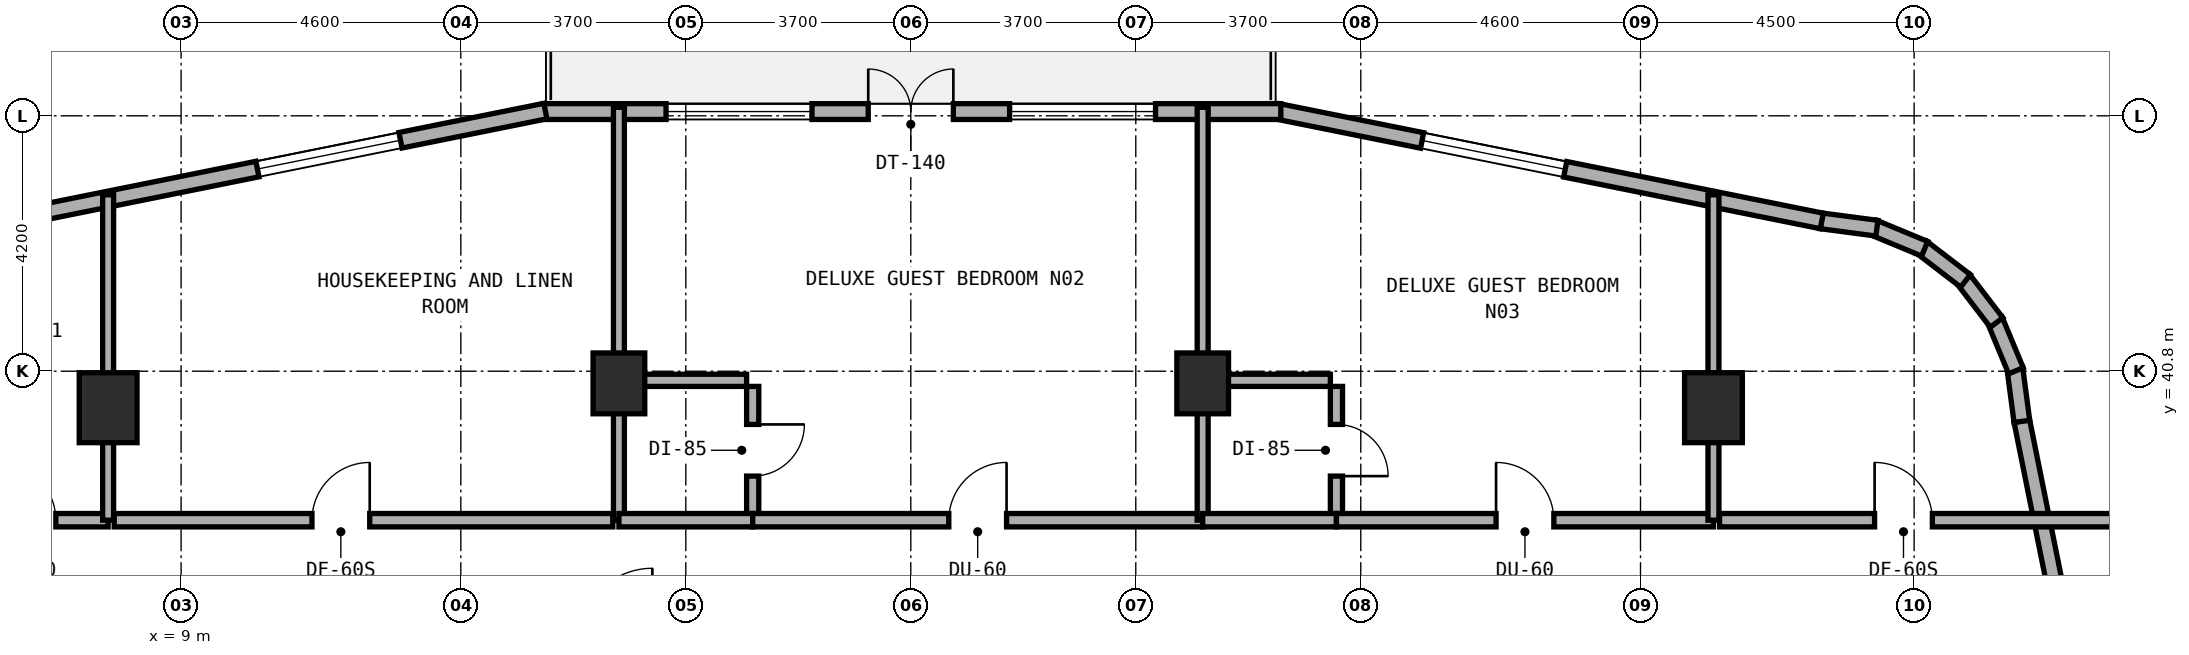
"""IFC4 building model, lengths in metres.
Left out: names, types, materials, properties, quantities, classifications, styles, units other than length and angle.
Written with IfcOpenShell. Run it as: python <this file> out.ifc"""

import sys

from ifc_helpers import new_model, si_unit, direction, frame, frame_2d, origin, origin_2d, place, context, subcontext, project, spatial, rectangle, extrude, element, fill, save


model = new_model("IFC4")
c1 = context("Model", 3, precision=1e-05, world=origin(), true_north=direction((0.0, 1.0)))
c2 = subcontext(c1, "Body", "Model", "MODEL_VIEW")
j1 = project(units=[si_unit("LENGTHUNIT", "METRE"), si_unit("PLANEANGLEUNIT", "RADIAN")], contexts=[c1])
p1 = place(None, origin())
s1 = spatial("IfcSite", under=j1, at=p1, CompositionType="ELEMENT")
p2 = place(p1, origin())
s2 = spatial("IfcBuilding", under=s1, at=p2, CompositionType="ELEMENT")
p3 = place(p2, frame((0.0, 0.0, 95.0)))
s3 = spatial("IfcBuildingStorey", under=s2, at=p3, CompositionType="ELEMENT", Elevation=95.0)
for number, where, z_axis, x_axis in (
    (1, (16.2, 40.6, 0.0), (0.0, 0.0, 1.0), (1.0, 0.0, 0.0)),
    (2, (25.8, 40.6, 0.0), (0.0, 0.0, 1.0), (1.0, 0.0, 0.0)),
):
    element("IfcColumn", number, at=place(p3, frame(where, z_axis=z_axis, x_axis=x_axis)), inside=s3, PredefinedType="COLUMN", context=c2, shape_type="SweptSolid", body=[
        extrude(rectangle(XDim=0.85, YDim=1.0, at=origin_2d()), origin(), (0.0, 0.0, 1.0), 3.5),
    ])
for number, where, z_axis, x_axis in (
    (3, (34.2, 40.2, 0.0), (0.0, 0.0, 1.0), (1.0, 0.0, 0.0)),
    (4, (7.8, 40.2, 0.0), (0.0, 0.0, 1.0), (1.0, 0.0, 0.0)),
):
    element("IfcColumn", number, at=place(p3, frame(where, z_axis=z_axis, x_axis=x_axis)), inside=s3, PredefinedType="COLUMN", context=c2, shape_type="SweptSolid", body=[
        extrude(rectangle(XDim=0.95, YDim=1.15, at=origin_2d()), origin(), (0.0, 0.0, 1.0), 3.5),
    ])
p4 = place(p3, frame((41.084, 30.98, 0.0), z_axis=(0.0, 0.0, 1.0), x_axis=(-0.197435082048, 0.980315963543, 0.0)))
e5 = element("IfcWall", 5, at=p4, inside=s3, PredefinedType="STANDARD", context=c2, shape_type="SweptSolid", body=[
    extrude(rectangle(XDim=9.183, YDim=0.26, at=frame_2d((4.591, 0.0))), origin(), (0.0, 0.0, 1.0), 3.22),
])
p5 = place(p4, frame((2.497, 0.0, 0.8)))
e6 = element("IfcOpeningElement", 6, at=p5, cuts=e5, PredefinedType="OPENING", context=c2, shape_type="SweptSolid", body=[
    extrude(rectangle(XDim=2.4, YDim=1.6, at=frame_2d((1.2, 0.8))), frame((0.0, 0.14, 0.0), z_axis=(0.0, -1.0, 0.0), x_axis=(1.0, 0.0, 0.0)), (0.0, 0.0, 1.0), 0.28),
])
p6 = place(p3, frame((39.272, 39.975, 0.0), z_axis=(0.0, 0.0, 1.0), x_axis=(-0.130953706898, 0.991388484223, 0.0)))
e7 = element("IfcWall", 7, at=p6, inside=s3, PredefinedType="STANDARD", context=c2, shape_type="SweptSolid", body=[
    extrude(rectangle(XDim=0.885, YDim=0.26, at=frame_2d((0.443, 0.0))), origin(), (0.0, 0.0, 1.0), 3.22),
])
p7 = place(p3, frame((39.174, 40.807, 0.0), z_axis=(0.0, 0.0, 1.0), x_axis=(-0.383290660547, 0.923627776508, 0.0)))
e8 = element("IfcWall", 8, at=p7, inside=s3, PredefinedType="STANDARD", context=c2, shape_type="SweptSolid", body=[
    extrude(rectangle(XDim=0.903, YDim=0.26, at=frame_2d((0.452, 0.0))), origin(), (0.0, 0.0, 1.0), 3.22),
])
p8 = place(p3, frame((38.856, 41.601, 0.0), z_axis=(0.0, 0.0, 1.0), x_axis=(-0.608624690463, 0.793458244748, 0.0)))
e9 = element("IfcWall", 9, at=p8, inside=s3, PredefinedType="STANDARD", context=c2, shape_type="SweptSolid", body=[
    extrude(rectangle(XDim=0.902, YDim=0.26, at=frame_2d((0.451, 0.0))), origin(), (0.0, 0.0, 1.0), 3.22),
])
p9 = place(p3, frame((38.345, 42.286, 0.0), z_axis=(0.0, 0.0, 1.0), x_axis=(-0.793558456666, 0.608494022858, 0.0)))
e10 = element("IfcWall", 10, at=p9, inside=s3, PredefinedType="STANDARD", context=c2, shape_type="SweptSolid", body=[
    extrude(rectangle(XDim=0.902, YDim=0.26, at=frame_2d((0.451, 0.0))), origin(), (0.0, 0.0, 1.0), 3.22),
])
p10 = place(p3, frame((37.673, 42.814, 0.0), z_axis=(0.0, 0.0, 1.0), x_axis=(-0.923683767999, 0.383155708213, 0.0)))
e11 = element("IfcWall", 11, at=p10, inside=s3, PredefinedType="STANDARD", context=c2, shape_type="SweptSolid", body=[
    extrude(rectangle(XDim=0.903, YDim=0.26, at=frame_2d((0.451, 0.0))), origin(), (0.0, 0.0, 1.0), 3.22),
])
p11 = place(p3, frame((36.888, 43.152, 0.0), z_axis=(0.0, 0.0, 1.0), x_axis=(-0.991487658083, 0.130200706103, 0.0)))
e12 = element("IfcWall", 12, at=p11, inside=s3, PredefinedType="STANDARD", context=c2, shape_type="SweptSolid", body=[
    extrude(rectangle(XDim=0.921, YDim=0.26, at=frame_2d((0.46, 0.0))), origin(), (0.0, 0.0, 1.0), 3.22),
])
p12 = place(p3, frame((35.982, 43.271, 0.0), z_axis=(0.0, 0.0, 1.0), x_axis=(-0.980317172899, 0.197429077186, 0.0)))
e13 = element("IfcWall", 13, at=p12, inside=s3, PredefinedType="STANDARD", context=c2, shape_type="SweptSolid", body=[
    extrude(rectangle(XDim=9.117, YDim=0.26, at=frame_2d((4.559, 0.0))), origin(), (0.0, 0.0, 1.0), 3.22),
])
p13 = place(p12, frame((4.305, 0.0, 0.8)))
e14 = element("IfcOpeningElement", 14, at=p13, cuts=e13, PredefinedType="OPENING", context=c2, shape_type="SweptSolid", body=[
    extrude(rectangle(XDim=2.4, YDim=1.6, at=frame_2d((1.2, 0.8))), frame((0.0, 0.14, 0.0), z_axis=(0.0, -1.0, 0.0), x_axis=(1.0, 0.0, 0.0)), (0.0, 0.0, 1.0), 0.28),
])
p14 = place(p3, frame((27.085, 45.07, 0.0), z_axis=(0.0, 0.0, 1.0), x_axis=(-1.0, 0.0, 0.0)))
e15 = element("IfcWall", 15, at=p14, inside=s3, PredefinedType="STANDARD", context=c2, shape_type="SweptSolid", body=[
    extrude(rectangle(XDim=12.135, YDim=0.26, at=frame_2d((6.067, 0.0))), origin(), (0.0, 0.0, 1.0), 3.22),
])
p15 = place(p14, frame((5.385, 0.0, 0.0)))
e16 = element("IfcOpeningElement", 16, at=p15, cuts=e15, PredefinedType="OPENING", context=c2, shape_type="SweptSolid", body=[
    extrude(rectangle(XDim=1.4, YDim=2.15, at=frame_2d((0.7, 1.075))), frame((0.0, 0.14, 0.0), z_axis=(0.0, -1.0, 0.0), x_axis=(1.0, 0.0, 0.0)), (0.0, 0.0, 1.0), 0.28),
])
p16 = place(p14, frame((2.06, 0.0, 0.8)))
e17 = element("IfcOpeningElement", 17, at=p16, cuts=e15, PredefinedType="OPENING", context=c2, shape_type="SweptSolid", body=[
    extrude(rectangle(XDim=2.4, YDim=1.6, at=frame_2d((1.2, 0.8))), frame((0.0, 0.14, 0.0), z_axis=(0.0, -1.0, 0.0), x_axis=(1.0, 0.0, 0.0)), (0.0, 0.0, 1.0), 0.28),
])
p17 = place(p14, frame((7.71, 0.0, 0.8)))
e18 = element("IfcOpeningElement", 18, at=p17, cuts=e15, PredefinedType="OPENING", context=c2, shape_type="SweptSolid", body=[
    extrude(rectangle(XDim=2.4, YDim=1.6, at=frame_2d((1.2, 0.8))), frame((0.0, 0.14, 0.0), z_axis=(0.0, -1.0, 0.0), x_axis=(1.0, 0.0, 0.0)), (0.0, 0.0, 1.0), 0.28),
])
p18 = place(p3, frame((14.991, 45.078, 0.0), z_axis=(0.0, 0.0, 1.0), x_axis=(-0.980321298532, -0.197408590603, 0.0)))
e19 = element("IfcWall", 19, at=p18, inside=s3, PredefinedType="STANDARD", context=c2, shape_type="SweptSolid", body=[
    extrude(rectangle(XDim=9.153, YDim=0.26, at=frame_2d((4.577, 0.0))), origin(), (0.0, 0.0, 1.0), 3.22),
])
p19 = place(p18, frame((2.431, 0.0, 0.8)))
e20 = element("IfcOpeningElement", 20, at=p19, cuts=e19, PredefinedType="OPENING", context=c2, shape_type="SweptSolid", body=[
    extrude(rectangle(XDim=2.4, YDim=1.6, at=frame_2d((1.2, 0.8))), frame((0.0, 0.14, 0.0), z_axis=(0.0, -1.0, 0.0), x_axis=(1.0, 0.0, 0.0)), (0.0, 0.0, 1.0), 0.28),
])
p20 = place(p3, frame((5.55, 38.35, 0.0), z_axis=(0.0, 0.0, 1.0), x_axis=(1.0, 0.0, 0.0)))
e21 = element("IfcWall", 21, at=p20, inside=s3, PredefinedType="SOLIDWALL", context=c2, shape_type="SweptSolid", body=[
    extrude(rectangle(XDim=2.25, YDim=0.22, at=frame_2d((1.125, 0.0))), origin(), (0.0, 0.0, 1.0), 2.595),
])
p21 = place(p20, frame((0.44, 0.0, 0.0)))
e22 = element("IfcOpeningElement", 22, at=p21, cuts=e21, PredefinedType="OPENING", context=c2, shape_type="SweptSolid", body=[
    extrude(rectangle(XDim=0.95, YDim=2.1, at=frame_2d((0.475, 1.05))), frame((0.0, 0.12, 0.0), z_axis=(0.0, -1.0, 0.0), x_axis=(1.0, 0.0, 0.0)), (0.0, 0.0, 1.0), 0.24),
])
p22 = place(p3, frame((7.8, 38.35, 0.0), z_axis=(0.0, 0.0, 1.0), x_axis=(0.0, 1.0, 0.0)))
e23 = element("IfcWall", 23, at=p22, inside=s3, PredefinedType="SOLIDWALL", context=c2, shape_type="SweptSolid", body=[
    extrude(rectangle(XDim=5.351, YDim=0.18, at=frame_2d((2.675, 0.0))), origin(), (0.0, 0.0, 1.0), 2.595),
])
p23 = place(p3, frame((7.9, 38.35, 0.0), z_axis=(0.0, 0.0, 1.0), x_axis=(1.0, 0.0, 0.0)))
e24 = element("IfcWall", 24, at=p23, inside=s3, PredefinedType="SOLIDWALL", context=c2, shape_type="SweptSolid", body=[
    extrude(rectangle(XDim=8.2, YDim=0.22, at=frame_2d((4.1, 0.0))), origin(), (0.0, 0.0, 1.0), 3.22),
])
p24 = place(p23, frame((3.252, 0.0, 0.0)))
e25 = element("IfcOpeningElement", 25, at=p24, cuts=e24, PredefinedType="OPENING", context=c2, shape_type="SweptSolid", body=[
    extrude(rectangle(XDim=0.95, YDim=2.1, at=frame_2d((0.475, 1.05))), frame((0.0, 0.12, 0.0), z_axis=(0.0, -1.0, 0.0), x_axis=(1.0, 0.0, 0.0)), (0.0, 0.0, 1.0), 0.24),
])
p25 = place(p3, frame((16.2, 38.35, 0.0), z_axis=(0.0, 0.0, 1.0), x_axis=(0.0, 1.0, 0.0)))
e26 = element("IfcWall", 26, at=p25, inside=s3, PredefinedType="SOLIDWALL", context=c2, shape_type="SweptSolid", body=[
    extrude(rectangle(XDim=6.79, YDim=0.18, at=frame_2d((3.395, 0.0))), origin(), (0.0, 0.0, 1.0), 2.595),
])
p26 = place(p3, frame((18.4, 38.45, 0.0), z_axis=(0.0, 0.0, 1.0), x_axis=(0.0, 1.0, 0.0)))
e27 = element("IfcWall", 27, at=p26, inside=s3, PredefinedType="PLUMBINGWALL", context=c2, shape_type="SweptSolid", body=[
    extrude(rectangle(XDim=2.1, YDim=0.2, at=frame_2d((1.05, 0.0))), origin(), (0.0, 0.0, 1.0), 2.835),
])
p27 = place(p26, frame((0.625, 0.0, 0.0)))
e28 = element("IfcOpeningElement", 28, at=p27, cuts=e27, PredefinedType="OPENING", context=c2, shape_type="SweptSolid", body=[
    extrude(rectangle(XDim=0.85, YDim=2.1, at=frame_2d((0.425, 1.05))), frame((0.0, 0.11, 0.0), z_axis=(0.0, -1.0, 0.0), x_axis=(1.0, 0.0, 0.0)), (0.0, 0.0, 1.0), 0.22),
])
p28 = place(p3, frame((16.3, 40.65, 0.0), z_axis=(0.0, 0.0, 1.0), x_axis=(1.0, 0.0, 0.0)))
e29 = element("IfcWall", 29, at=p28, inside=s3, PredefinedType="PLUMBINGWALL", context=c2, shape_type="SweptSolid", body=[
    extrude(rectangle(XDim=2.0, YDim=0.2, at=frame_2d((1.0, 0.0))), origin(), (0.0, 0.0, 1.0), 2.835),
])
p29 = place(p3, frame((16.2, 38.35, 0.0), z_axis=(0.0, 0.0, 1.0), x_axis=(1.0, 0.0, 0.0)))
e30 = element("IfcWall", 30, at=p29, inside=s3, PredefinedType="SOLIDWALL", context=c2, shape_type="SweptSolid", body=[
    extrude(rectangle(XDim=2.2, YDim=0.22, at=frame_2d((1.1, 0.0))), origin(), (0.0, 0.0, 1.0), 2.595),
])
p30 = place(p3, frame((18.4, 38.35, 0.0), z_axis=(0.0, 0.0, 1.0), x_axis=(1.0, 0.0, 0.0)))
e31 = element("IfcWall", 31, at=p30, inside=s3, PredefinedType="SOLIDWALL", context=c2, shape_type="SweptSolid", body=[
    extrude(rectangle(XDim=7.4, YDim=0.22, at=frame_2d((3.7, 0.0))), origin(), (0.0, 0.0, 1.0), 2.595),
])
p31 = place(p30, frame((3.225, 0.0, 0.0)))
e32 = element("IfcOpeningElement", 32, at=p31, cuts=e31, PredefinedType="OPENING", context=c2, shape_type="SweptSolid", body=[
    extrude(rectangle(XDim=0.95, YDim=2.1, at=frame_2d((0.475, 1.05))), frame((0.0, 0.12, 0.0), z_axis=(0.0, -1.0, 0.0), x_axis=(1.0, 0.0, 0.0)), (0.0, 0.0, 1.0), 0.24),
])
p32 = place(p3, frame((25.8, 38.35, 0.0), z_axis=(0.0, 0.0, 1.0), x_axis=(0.0, 1.0, 0.0)))
e33 = element("IfcWall", 33, at=p32, inside=s3, PredefinedType="SOLIDWALL", context=c2, shape_type="SweptSolid", body=[
    extrude(rectangle(XDim=6.79, YDim=0.18, at=frame_2d((3.395, 0.0))), origin(), (0.0, 0.0, 1.0), 2.595),
])
p33 = place(p3, frame((28.0, 38.45, 0.0), z_axis=(0.0, 0.0, 1.0), x_axis=(0.0, 1.0, 0.0)))
e34 = element("IfcWall", 34, at=p33, inside=s3, PredefinedType="PLUMBINGWALL", context=c2, shape_type="SweptSolid", body=[
    extrude(rectangle(XDim=2.1, YDim=0.2, at=frame_2d((1.05, 0.0))), origin(), (0.0, 0.0, 1.0), 2.835),
])
p34 = place(p33, frame((0.625, 0.0, 0.0)))
e35 = element("IfcOpeningElement", 35, at=p34, cuts=e34, PredefinedType="OPENING", context=c2, shape_type="SweptSolid", body=[
    extrude(rectangle(XDim=0.85, YDim=2.1, at=frame_2d((0.425, 1.05))), frame((0.0, 0.11, 0.0), z_axis=(0.0, -1.0, 0.0), x_axis=(1.0, 0.0, 0.0)), (0.0, 0.0, 1.0), 0.22),
])
p35 = place(p3, frame((25.9, 40.65, 0.0), z_axis=(0.0, 0.0, 1.0), x_axis=(1.0, 0.0, 0.0)))
e36 = element("IfcWall", 36, at=p35, inside=s3, PredefinedType="PLUMBINGWALL", context=c2, shape_type="SweptSolid", body=[
    extrude(rectangle(XDim=2.0, YDim=0.2, at=frame_2d((1.0, 0.0))), origin(), (0.0, 0.0, 1.0), 2.835),
])
p36 = place(p3, frame((25.8, 38.35, 0.0), z_axis=(0.0, 0.0, 1.0), x_axis=(1.0, 0.0, 0.0)))
e37 = element("IfcWall", 37, at=p36, inside=s3, PredefinedType="SOLIDWALL", context=c2, shape_type="SweptSolid", body=[
    extrude(rectangle(XDim=2.2, YDim=0.22, at=frame_2d((1.1, 0.0))), origin(), (0.0, 0.0, 1.0), 2.595),
])
p37 = place(p3, frame((28.0, 38.35, 0.0), z_axis=(0.0, 0.0, 1.0), x_axis=(1.0, 0.0, 0.0)))
e38 = element("IfcWall", 38, at=p37, inside=s3, PredefinedType="SOLIDWALL", context=c2, shape_type="SweptSolid", body=[
    extrude(rectangle(XDim=6.2, YDim=0.22, at=frame_2d((3.1, 0.0))), origin(), (0.0, 0.0, 1.0), 2.595),
])
p38 = place(p37, frame((2.625, 0.0, 0.0)))
e39 = element("IfcOpeningElement", 39, at=p38, cuts=e38, PredefinedType="OPENING", context=c2, shape_type="SweptSolid", body=[
    extrude(rectangle(XDim=0.95, YDim=2.1, at=frame_2d((0.475, 1.05))), frame((0.0, 0.12, 0.0), z_axis=(0.0, -1.0, 0.0), x_axis=(1.0, 0.0, 0.0)), (0.0, 0.0, 1.0), 0.24),
])
p39 = place(p3, frame((34.2, 38.35, 0.0), z_axis=(0.0, 0.0, 1.0), x_axis=(0.0, 1.0, 0.0)))
e40 = element("IfcWall", 40, at=p39, inside=s3, PredefinedType="SOLIDWALL", context=c2, shape_type="SweptSolid", body=[
    extrude(rectangle(XDim=5.351, YDim=0.18, at=frame_2d((2.675, 0.0))), origin(), (0.0, 0.0, 1.0), 2.595),
])
p40 = place(p3, frame((34.3, 38.35, 0.0), z_axis=(0.0, 0.0, 1.0), x_axis=(1.0, 0.0, 0.0)))
e41 = element("IfcWall", 41, at=p40, inside=s3, PredefinedType="SOLIDWALL", context=c2, shape_type="SweptSolid", body=[
    extrude(rectangle(XDim=6.64, YDim=0.22, at=frame_2d((3.32, 0.0))), origin(), (0.0, 0.0, 1.0), 2.835),
])
p41 = place(p40, frame((2.55, 0.0, 0.0)))
e42 = element("IfcOpeningElement", 42, at=p41, cuts=e41, PredefinedType="OPENING", context=c2, shape_type="SweptSolid", body=[
    extrude(rectangle(XDim=0.95, YDim=2.1, at=frame_2d((0.475, 1.05))), frame((0.0, 0.12, 0.0), z_axis=(0.0, -1.0, 0.0), x_axis=(1.0, 0.0, 0.0)), (0.0, 0.0, 1.0), 0.24),
])
p42 = place(p13, origin())
e43 = element("IfcWindow", 43, at=p42, inside=s3, PartitioningType="SINGLE_PANEL", PredefinedType="WINDOW", context=c2, shape_type="SweptSolid", body=[
    extrude(rectangle(XDim=2.4, YDim=1.6, at=frame_2d((1.2, 0.8))), frame((0.0, 0.03, 0.0), z_axis=(0.0, -1.0, 0.0), x_axis=(1.0, 0.0, 0.0)), (0.0, 0.0, 1.0), 0.06),
])
fill(e14, e43)
p43 = place(p15, frame((1.4, 0.0, 0.0), z_axis=(0.0, 0.0, 1.0), x_axis=(-1.0, 0.0, 0.0)))
e44 = element("IfcDoor", 44, at=p43, inside=s3, OperationType="DOUBLE_DOOR_SINGLE_SWING", PredefinedType="DOOR", context=c2, shape_type="SweptSolid", body=[
    extrude(rectangle(XDim=1.4, YDim=2.15, at=frame_2d((0.7, 1.075))), frame((0.0, 0.025, 0.0), z_axis=(0.0, -1.0, 0.0), x_axis=(1.0, 0.0, 0.0)), (0.0, 0.0, 1.0), 0.05),
])
fill(e16, e44)
p44 = place(p16, origin())
e45 = element("IfcWindow", 45, at=p44, inside=s3, PartitioningType="SINGLE_PANEL", PredefinedType="WINDOW", context=c2, shape_type="SweptSolid", body=[
    extrude(rectangle(XDim=2.4, YDim=1.6, at=frame_2d((1.2, 0.8))), frame((0.0, 0.03, 0.0), z_axis=(0.0, -1.0, 0.0), x_axis=(1.0, 0.0, 0.0)), (0.0, 0.0, 1.0), 0.06),
])
fill(e17, e45)
p45 = place(p17, origin())
e46 = element("IfcWindow", 46, at=p45, inside=s3, PartitioningType="SINGLE_PANEL", PredefinedType="WINDOW", context=c2, shape_type="SweptSolid", body=[
    extrude(rectangle(XDim=2.4, YDim=1.6, at=frame_2d((1.2, 0.8))), frame((0.0, 0.03, 0.0), z_axis=(0.0, -1.0, 0.0), x_axis=(1.0, 0.0, 0.0)), (0.0, 0.0, 1.0), 0.06),
])
fill(e18, e46)
p46 = place(p19, origin())
e47 = element("IfcWindow", 47, at=p46, inside=s3, PartitioningType="SINGLE_PANEL", PredefinedType="WINDOW", context=c2, shape_type="SweptSolid", body=[
    extrude(rectangle(XDim=2.4, YDim=1.6, at=frame_2d((1.2, 0.8))), frame((0.0, 0.03, 0.0), z_axis=(0.0, -1.0, 0.0), x_axis=(1.0, 0.0, 0.0)), (0.0, 0.0, 1.0), 0.06),
])
fill(e20, e47)
p47 = place(p21, origin())
e48 = element("IfcDoor", 48, at=p47, inside=s3, OperationType="SINGLE_SWING_LEFT", PredefinedType="DOOR", context=c2, shape_type="SweptSolid", body=[
    extrude(rectangle(XDim=0.95, YDim=2.1, at=frame_2d((0.475, 1.05))), frame((0.0, 0.025, 0.0), z_axis=(0.0, -1.0, 0.0), x_axis=(1.0, 0.0, 0.0)), (0.0, 0.0, 1.0), 0.05),
])
fill(e22, e48)
p48 = place(p24, origin())
e49 = element("IfcDoor", 49, at=p48, inside=s3, OperationType="SINGLE_SWING_RIGHT", PredefinedType="DOOR", context=c2, shape_type="SweptSolid", body=[
    extrude(rectangle(XDim=0.95, YDim=2.1, at=frame_2d((0.475, 1.05))), frame((0.0, 0.025, 0.0), z_axis=(0.0, -1.0, 0.0), x_axis=(1.0, 0.0, 0.0)), (0.0, 0.0, 1.0), 0.05),
])
fill(e25, e49)
p49 = place(p27, frame((0.85, 0.0, 0.0), z_axis=(0.0, 0.0, 1.0), x_axis=(-1.0, 0.0, 0.0)))
e50 = element("IfcDoor", 50, at=p49, inside=s3, OperationType="SINGLE_SWING_LEFT", PredefinedType="DOOR", context=c2, shape_type="SweptSolid", body=[
    extrude(rectangle(XDim=0.85, YDim=2.1, at=frame_2d((0.425, 1.05))), frame((0.0, 0.025, 0.0), z_axis=(0.0, -1.0, 0.0), x_axis=(1.0, 0.0, 0.0)), (0.0, 0.0, 1.0), 0.05),
])
fill(e28, e50)
p50 = place(p31, origin())
e51 = element("IfcDoor", 51, at=p50, inside=s3, OperationType="SINGLE_SWING_RIGHT", PredefinedType="DOOR", context=c2, shape_type="SweptSolid", body=[
    extrude(rectangle(XDim=0.95, YDim=2.1, at=frame_2d((0.475, 1.05))), frame((0.0, 0.025, 0.0), z_axis=(0.0, -1.0, 0.0), x_axis=(1.0, 0.0, 0.0)), (0.0, 0.0, 1.0), 0.05),
])
fill(e32, e51)
p51 = place(p34, frame((0.85, 0.0, 0.0), z_axis=(0.0, 0.0, 1.0), x_axis=(-1.0, 0.0, 0.0)))
e52 = element("IfcDoor", 52, at=p51, inside=s3, OperationType="SINGLE_SWING_RIGHT", PredefinedType="DOOR", context=c2, shape_type="SweptSolid", body=[
    extrude(rectangle(XDim=0.85, YDim=2.1, at=frame_2d((0.425, 1.05))), frame((0.0, 0.025, 0.0), z_axis=(0.0, -1.0, 0.0), x_axis=(1.0, 0.0, 0.0)), (0.0, 0.0, 1.0), 0.05),
])
fill(e35, e52)
p52 = place(p38, origin())
e53 = element("IfcDoor", 53, at=p52, inside=s3, OperationType="SINGLE_SWING_LEFT", PredefinedType="DOOR", context=c2, shape_type="SweptSolid", body=[
    extrude(rectangle(XDim=0.95, YDim=2.1, at=frame_2d((0.475, 1.05))), frame((0.0, 0.025, 0.0), z_axis=(0.0, -1.0, 0.0), x_axis=(1.0, 0.0, 0.0)), (0.0, 0.0, 1.0), 0.05),
])
fill(e39, e53)
p53 = place(p41, origin())
e54 = element("IfcDoor", 54, at=p53, inside=s3, OperationType="SINGLE_SWING_LEFT", PredefinedType="DOOR", context=c2, shape_type="SweptSolid", body=[
    extrude(rectangle(XDim=0.95, YDim=2.1, at=frame_2d((0.475, 1.05))), frame((0.0, 0.025, 0.0), z_axis=(0.0, -1.0, 0.0), x_axis=(1.0, 0.0, 0.0)), (0.0, 0.0, 1.0), 0.05),
])
fill(e42, e54)
save(model, sys.argv[1])
